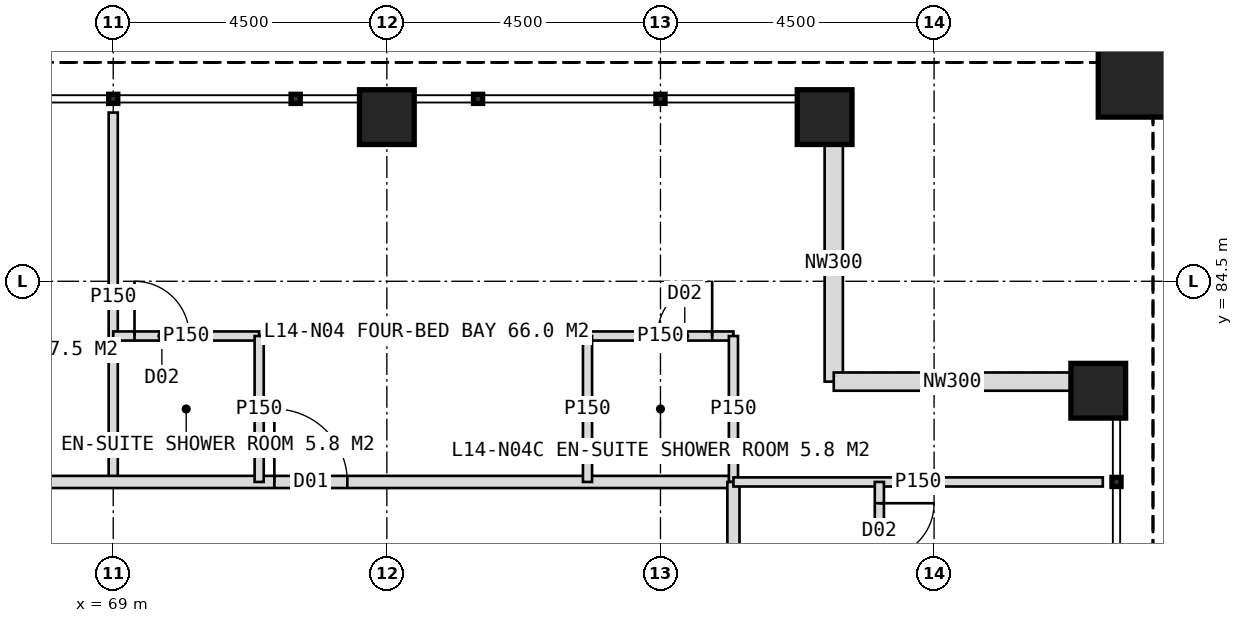
"""IFC4 building model, lengths in metres.
Left out: names, types, materials, properties, quantities, classifications, styles, units other than length and angle.
Written with IfcOpenShell. Run it as: python <this file> out.ifc"""

import sys

from ifc_helpers import new_model, si_unit, direction, frame, frame_2d, origin, origin_2d, place, context, subcontext, project, spatial, rectangle, hollow_rectangle, extrude, element, fill, save


model = new_model("IFC4")
c1 = context("Model", 3, precision=1e-05, world=origin(), true_north=direction((0.0, 1.0)))
c2 = subcontext(c1, "Body", "Model", "MODEL_VIEW")
j1 = project(units=[si_unit("LENGTHUNIT", "METRE"), si_unit("PLANEANGLEUNIT", "RADIAN")], contexts=[c1])
p1 = place(None, origin())
s1 = spatial("IfcSite", under=j1, at=p1, CompositionType="ELEMENT")
p2 = place(p1, origin())
s2 = spatial("IfcBuilding", under=s1, at=p2, CompositionType="ELEMENT")
p3 = place(p2, frame((0.0, 0.0, 63.0)))
s3 = spatial("IfcBuildingStorey", under=s2, at=p3, CompositionType="ELEMENT", Elevation=63.0)
for number, where, z_axis, x_axis in (
    (1, (73.5, 87.2, 0.0), (0.0, 0.0, 1.0), (1.0, 0.0, 0.0)),
    (2, (80.7, 87.2, 0.0), (0.0, 0.0, 1.0), (1.0, 0.0, 0.0)),
    (3, (85.2, 82.7, 0.0), (0.0, 0.0, 1.0), (1.0, 0.0, 0.0)),
):
    element("IfcColumn", number, at=place(p3, frame(where, z_axis=z_axis, x_axis=x_axis)), inside=s3, PredefinedType="COLUMN", context=c2, shape_type="SweptSolid", body=[
        extrude(hollow_rectangle(XDim=0.9, YDim=0.9, WallThickness=0.08, at=origin_2d()), origin(), (0.0, 0.0, 1.0), 4.0),
    ])
p4 = place(p3, frame((86.1, 88.1, 0.0), z_axis=(0.0, 0.0, 1.0), x_axis=(1.0, 0.0, 0.0)))
e4 = element("IfcColumn", 4, at=p4, inside=s3, PredefinedType="COLUMN", context=c2, shape_type="SweptSolid", body=[
    extrude(hollow_rectangle(XDim=1.8, YDim=1.8, WallThickness=0.1, at=origin_2d()), origin(), (0.0, 0.0, 1.0), 4.0),
])
for number, where, z_axis, x_axis in (
    (5, (80.85, 86.75, 0.0), (0.0, 0.0, 1.0), (0.0, -1.0, 0.0)),
    (6, (80.85, 82.85, 0.0), (0.0, 0.0, 1.0), (1.0, 0.0, 0.0)),
):
    element("IfcWall", number, at=place(p3, frame(where, z_axis=z_axis, x_axis=x_axis)), inside=s3, PredefinedType="ELEMENTEDWALL", context=c2, shape_type="SweptSolid", body=[
        extrude(rectangle(XDim=3.9, YDim=0.3, at=frame_2d((1.95, 0.0))), origin(), (0.0, 0.0, 1.0), 2.95),
    ])
p5 = place(p3, frame((69.0, 81.2, 0.0), z_axis=(0.0, 0.0, 1.0), x_axis=(0.0, 1.0, 0.0)))
e7 = element("IfcWall", 7, at=p5, inside=s3, PredefinedType="PARTITIONING", context=c2, shape_type="SweptSolid", body=[
    extrude(rectangle(XDim=6.075, YDim=0.15, at=frame_2d((3.038, 0.0))), origin(), (0.0, 0.0, 1.0), 3.75),
])
p6 = place(p3, frame((40.8, 81.2, 0.0), z_axis=(0.0, 0.0, 1.0), x_axis=(1.0, 0.0, 0.0)))
e8 = element("IfcWall", 8, at=p6, inside=s3, PredefinedType="PARTITIONING", context=c2, shape_type="SweptSolid", body=[
    extrude(rectangle(XDim=38.4, YDim=0.2, at=frame_2d((19.2, 0.0))), origin(), (0.0, 0.0, 1.0), 3.75),
])
p7 = place(p6, frame((4.5, 0.0, 0.0)))
e9 = element("IfcOpeningElement", 9, at=p7, cuts=e8, PredefinedType="OPENING", context=c2, shape_type="SweptSolid", body=[
    extrude(rectangle(XDim=1.2, YDim=2.2, at=frame_2d((0.6, 1.1))), frame((0.0, 0.11, 0.0), z_axis=(0.0, -1.0, 0.0), x_axis=(1.0, 0.0, 0.0)), (0.0, 0.0, 1.0), 0.22),
])
p8 = place(p6, frame((13.45, 0.0, 0.0)))
e10 = element("IfcOpeningElement", 10, at=p8, cuts=e8, PredefinedType="OPENING", context=c2, shape_type="SweptSolid", body=[
    extrude(rectangle(XDim=1.2, YDim=2.2, at=frame_2d((0.6, 1.1))), frame((0.0, 0.11, 0.0), z_axis=(0.0, -1.0, 0.0), x_axis=(1.0, 0.0, 0.0)), (0.0, 0.0, 1.0), 0.22),
])
p9 = place(p6, frame((22.45, 0.0, 0.0)))
e11 = element("IfcOpeningElement", 11, at=p9, cuts=e8, PredefinedType="OPENING", context=c2, shape_type="SweptSolid", body=[
    extrude(rectangle(XDim=1.2, YDim=2.2, at=frame_2d((0.6, 1.1))), frame((0.0, 0.11, 0.0), z_axis=(0.0, -1.0, 0.0), x_axis=(1.0, 0.0, 0.0)), (0.0, 0.0, 1.0), 0.22),
])
p10 = place(p6, frame((30.85, 0.0, 0.0)))
e12 = element("IfcOpeningElement", 12, at=p10, cuts=e8, PredefinedType="OPENING", context=c2, shape_type="SweptSolid", body=[
    extrude(rectangle(XDim=1.2, YDim=2.2, at=frame_2d((0.6, 1.1))), frame((0.0, 0.11, 0.0), z_axis=(0.0, -1.0, 0.0), x_axis=(1.0, 0.0, 0.0)), (0.0, 0.0, 1.0), 0.22),
])
p11 = place(p3, frame((69.0, 83.6, 0.0), z_axis=(0.0, 0.0, 1.0), x_axis=(1.0, 0.0, 0.0)))
e13 = element("IfcWall", 13, at=p11, inside=s3, PredefinedType="PARTITIONING", context=c2, shape_type="SweptSolid", body=[
    extrude(rectangle(XDim=2.4, YDim=0.15, at=frame_2d((1.2, 0.0))), origin(), (0.0, 0.0, 1.0), 3.75),
])
p12 = place(p11, frame((0.35, 0.0, 0.0)))
e14 = element("IfcOpeningElement", 14, at=p12, cuts=e13, PredefinedType="OPENING", context=c2, shape_type="SweptSolid", body=[
    extrude(rectangle(XDim=0.9, YDim=2.1, at=frame_2d((0.45, 1.05))), frame((0.0, 0.085, 0.0), z_axis=(0.0, -1.0, 0.0), x_axis=(1.0, 0.0, 0.0)), (0.0, 0.0, 1.0), 0.17),
])
p13 = place(p3, frame((71.4, 81.2, 0.0), z_axis=(0.0, 0.0, 1.0), x_axis=(0.0, 1.0, 0.0)))
e15 = element("IfcWall", 15, at=p13, inside=s3, PredefinedType="PARTITIONING", context=c2, shape_type="SweptSolid", body=[
    extrude(rectangle(XDim=2.4, YDim=0.15, at=frame_2d((1.2, 0.0))), origin(), (0.0, 0.0, 1.0), 3.75),
])
p14 = place(p3, frame((76.8, 83.6, 0.0), z_axis=(0.0, 0.0, 1.0), x_axis=(1.0, 0.0, 0.0)))
e16 = element("IfcWall", 16, at=p14, inside=s3, PredefinedType="PARTITIONING", context=c2, shape_type="SweptSolid", body=[
    extrude(rectangle(XDim=2.4, YDim=0.15, at=frame_2d((1.2, 0.0))), origin(), (0.0, 0.0, 1.0), 3.75),
])
p15 = place(p14, frame((1.15, 0.0, 0.0)))
e17 = element("IfcOpeningElement", 17, at=p15, cuts=e16, PredefinedType="OPENING", context=c2, shape_type="SweptSolid", body=[
    extrude(rectangle(XDim=0.9, YDim=2.1, at=frame_2d((0.45, 1.05))), frame((0.0, 0.085, 0.0), z_axis=(0.0, -1.0, 0.0), x_axis=(1.0, 0.0, 0.0)), (0.0, 0.0, 1.0), 0.17),
])
for number, where, z_axis, x_axis in (
    (18, (76.8, 81.2, 0.0), (0.0, 0.0, 1.0), (0.0, 1.0, 0.0)),
    (19, (79.2, 81.2, 0.0), (0.0, 0.0, 1.0), (0.0, 1.0, 0.0)),
):
    element("IfcWall", number, at=place(p3, frame(where, z_axis=z_axis, x_axis=x_axis)), inside=s3, PredefinedType="PARTITIONING", context=c2, shape_type="SweptSolid", body=[
        extrude(rectangle(XDim=2.4, YDim=0.15, at=frame_2d((1.2, 0.0))), origin(), (0.0, 0.0, 1.0), 3.75),
    ])
p16 = place(p3, frame((79.2, 81.2, 0.0), z_axis=(0.0, 0.0, 1.0), x_axis=(0.0, -1.0, 0.0)))
e20 = element("IfcWall", 20, at=p16, inside=s3, PredefinedType="PARTITIONING", context=c2, shape_type="SweptSolid", body=[
    extrude(rectangle(XDim=38.4, YDim=0.2, at=frame_2d((19.2, 0.0))), origin(), (0.0, 0.0, 1.0), 3.75),
])
p17 = place(p16, frame((3.25, 0.0, 0.0)))
e21 = element("IfcOpeningElement", 21, at=p17, cuts=e20, PredefinedType="OPENING", context=c2, shape_type="SweptSolid", body=[
    extrude(rectangle(XDim=1.2, YDim=2.2, at=frame_2d((0.6, 1.1))), frame((0.0, 0.11, 0.0), z_axis=(0.0, -1.0, 0.0), x_axis=(1.0, 0.0, 0.0)), (0.0, 0.0, 1.0), 0.22),
])
p18 = place(p16, frame((13.45, 0.0, 0.0)))
e22 = element("IfcOpeningElement", 22, at=p18, cuts=e20, PredefinedType="OPENING", context=c2, shape_type="SweptSolid", body=[
    extrude(rectangle(XDim=1.2, YDim=2.2, at=frame_2d((0.6, 1.1))), frame((0.0, 0.11, 0.0), z_axis=(0.0, -1.0, 0.0), x_axis=(1.0, 0.0, 0.0)), (0.0, 0.0, 1.0), 0.22),
])
p19 = place(p16, frame((21.85, 0.0, 0.0)))
e23 = element("IfcOpeningElement", 23, at=p19, cuts=e20, PredefinedType="OPENING", context=c2, shape_type="SweptSolid", body=[
    extrude(rectangle(XDim=1.2, YDim=2.2, at=frame_2d((0.6, 1.1))), frame((0.0, 0.11, 0.0), z_axis=(0.0, -1.0, 0.0), x_axis=(1.0, 0.0, 0.0)), (0.0, 0.0, 1.0), 0.22),
])
p20 = place(p16, frame((27.85, 0.0, 0.0)))
e24 = element("IfcOpeningElement", 24, at=p20, cuts=e20, PredefinedType="OPENING", context=c2, shape_type="SweptSolid", body=[
    extrude(rectangle(XDim=1.2, YDim=2.2, at=frame_2d((0.6, 1.1))), frame((0.0, 0.11, 0.0), z_axis=(0.0, -1.0, 0.0), x_axis=(1.0, 0.0, 0.0)), (0.0, 0.0, 1.0), 0.22),
])
p21 = place(p3, frame((79.2, 81.2, 0.0), z_axis=(0.0, 0.0, 1.0), x_axis=(1.0, 0.0, 0.0)))
e25 = element("IfcWall", 25, at=p21, inside=s3, PredefinedType="PARTITIONING", context=c2, shape_type="SweptSolid", body=[
    extrude(rectangle(XDim=6.075, YDim=0.15, at=frame_2d((3.038, 0.0))), origin(), (0.0, 0.0, 1.0), 3.75),
])
p22 = place(p3, frame((81.6, 81.2, 0.0), z_axis=(0.0, 0.0, 1.0), x_axis=(0.0, -1.0, 0.0)))
e26 = element("IfcWall", 26, at=p22, inside=s3, PredefinedType="PARTITIONING", context=c2, shape_type="SweptSolid", body=[
    extrude(rectangle(XDim=3.0, YDim=0.15, at=frame_2d((1.5, 0.0))), origin(), (0.0, 0.0, 1.0), 3.75),
])
p23 = place(p22, frame((0.35, 0.0, 0.0)))
e27 = element("IfcOpeningElement", 27, at=p23, cuts=e26, PredefinedType="OPENING", context=c2, shape_type="SweptSolid", body=[
    extrude(rectangle(XDim=0.9, YDim=2.1, at=frame_2d((0.45, 1.05))), frame((0.0, 0.085, 0.0), z_axis=(0.0, -1.0, 0.0), x_axis=(1.0, 0.0, 0.0)), (0.0, 0.0, 1.0), 0.17),
])
p24 = place(p10, origin())
e28 = element("IfcDoor", 28, at=p24, inside=s3, OperationType="SINGLE_SWING_LEFT", PredefinedType="DOOR", context=c2, shape_type="SweptSolid", body=[
    extrude(rectangle(XDim=1.2, YDim=2.2, at=frame_2d((0.6, 1.1))), frame((0.0, 0.025, 0.0), z_axis=(0.0, -1.0, 0.0), x_axis=(1.0, 0.0, 0.0)), (0.0, 0.0, 1.0), 0.05),
])
fill(e12, e28)
p25 = place(p12, origin())
e29 = element("IfcDoor", 29, at=p25, inside=s3, OperationType="SINGLE_SWING_LEFT", PredefinedType="DOOR", context=c2, shape_type="SweptSolid", body=[
    extrude(rectangle(XDim=0.9, YDim=2.1, at=frame_2d((0.45, 1.05))), frame((0.0, 0.025, 0.0), z_axis=(0.0, -1.0, 0.0), x_axis=(1.0, 0.0, 0.0)), (0.0, 0.0, 1.0), 0.05),
])
fill(e14, e29)
p26 = place(p15, origin())
e30 = element("IfcDoor", 30, at=p26, inside=s3, OperationType="SINGLE_SWING_RIGHT", PredefinedType="DOOR", context=c2, shape_type="SweptSolid", body=[
    extrude(rectangle(XDim=0.9, YDim=2.1, at=frame_2d((0.45, 1.05))), frame((0.0, 0.025, 0.0), z_axis=(0.0, -1.0, 0.0), x_axis=(1.0, 0.0, 0.0)), (0.0, 0.0, 1.0), 0.05),
])
fill(e17, e30)
p27 = place(p23, origin())
e31 = element("IfcDoor", 31, at=p27, inside=s3, OperationType="SINGLE_SWING_LEFT", PredefinedType="DOOR", context=c2, shape_type="SweptSolid", body=[
    extrude(rectangle(XDim=0.9, YDim=2.1, at=frame_2d((0.45, 1.05))), frame((0.0, 0.025, 0.0), z_axis=(0.0, -1.0, 0.0), x_axis=(1.0, 0.0, 0.0)), (0.0, 0.0, 1.0), 0.05),
])
fill(e27, e31)
save(model, sys.argv[1])
